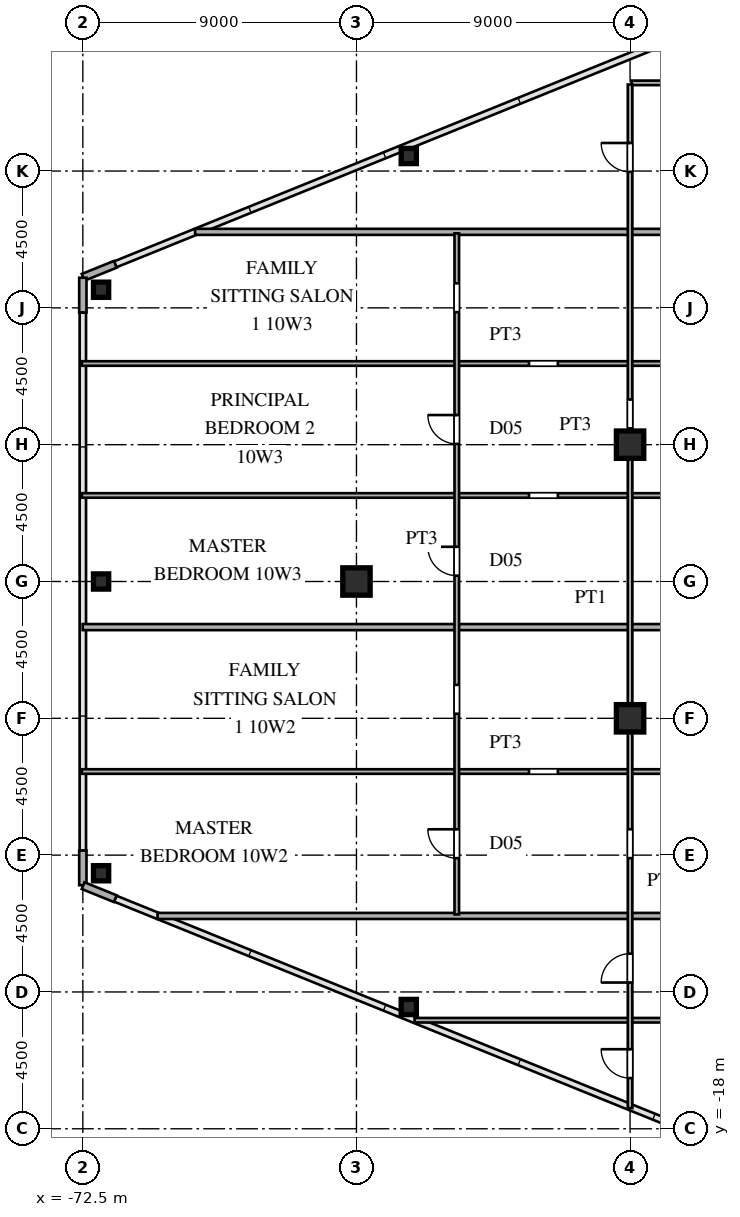
"""IFC4 building model, lengths in metres.
Left out: names, types, materials, properties, quantities, classifications, styles, units other than length and angle.
Written with IfcOpenShell. Run it as: python <this file> out.ifc"""

import sys

from ifc_helpers import new_model, si_unit, direction, frame, frame_2d, origin, origin_2d, place, context, subcontext, project, spatial, rectangle, hollow_rectangle, i_section, extrude, source, transform, mapped, element, fill, save


model = new_model("IFC4")
c1 = context("Model", 3, precision=1e-05, world=origin(), true_north=direction((0.0, 1.0)))
c2 = subcontext(c1, "Body", "Model", "MODEL_VIEW")
j1 = project(units=[si_unit("LENGTHUNIT", "METRE"), si_unit("PLANEANGLEUNIT", "RADIAN")], contexts=[c1])
p1 = place(None, origin())
s1 = spatial("IfcSite", under=j1, at=p1, CompositionType="ELEMENT")
p2 = place(p1, origin())
s2 = spatial("IfcBuilding", under=s1, at=p2, CompositionType="ELEMENT")
p3 = place(p2, frame((0.0, 0.0, 40.5)))
s3 = spatial("IfcBuildingStorey", under=s2, at=p3, CompositionType="ELEMENT", Elevation=40.5)
m1 = source(origin(), c2, "Body", "SweptSolid", [
    extrude(i_section(OverallWidth=0.9, OverallDepth=0.9, WebThickness=0.036, FlangeThickness=0.055, at=origin_2d()), origin(), (0.0, 0.0, 1.0), 3.6),
])
for number, where, z_axis, x_axis in (
    (1, (-54.5, -4.5, 0.0), (0.0, 0.0, 1.0), (1.0, 0.0, 0.0)),
    (2, (-54.5, 4.5, 0.0), (0.0, 0.0, 1.0), (1.0, 0.0, 0.0)),
    (3, (-63.5, 0.0, 0.0), (0.0, 0.0, 1.0), (1.0, 0.0, 0.0)),
):
    element("IfcColumn", number, at=place(p3, frame(where, z_axis=z_axis, x_axis=x_axis)), inside=s3, PredefinedType="COLUMN", context=c2, shape_type="MappedRepresentation", body=[
        mapped(m1, transform((0.0, 0.0, 0.0), scale=1.0)),
    ])
m2 = source(origin(), c2, "Body", "SweptSolid", [
    extrude(hollow_rectangle(XDim=0.5, YDim=0.5, WallThickness=0.02, at=origin_2d()), origin(), (0.0, 0.0, 1.0), 3.6),
])
for number, where, z_axis, x_axis in (
    (4, (-71.9, 9.596, 0.0), (0.0, 0.0, 1.0), (1.0, 0.0, 0.0)),
    (5, (-71.9, -9.596, 0.0), (0.0, 0.0, 1.0), (1.0, 0.0, 0.0)),
    (6, (-61.779, -13.994, 0.0), (0.0, 0.0, 1.0), (1.0, 0.0, 0.0)),
    (7, (-61.779, 13.994, 0.0), (0.0, 0.0, 1.0), (1.0, 0.0, 0.0)),
    (8, (-71.9, 0.0, 0.0), (0.0, 0.0, 1.0), (1.0, 0.0, 0.0)),
):
    element("IfcColumn", number, at=place(p3, frame(where, z_axis=z_axis, x_axis=x_axis)), inside=s3, PredefinedType="COLUMN", context=c2, shape_type="MappedRepresentation", body=[
        mapped(m2, transform((0.0, 0.0, 0.0), scale=1.0)),
    ])
for number, where, z_axis, x_axis in (
    (9, (-71.434, 10.431, 0.0), (0.0, 0.0, 1.0), (-0.927, -0.375, 0.0)),
    (10, (-72.5, 9.99, 0.0), (0.0, 0.0, 1.0), (0.0, -1.0, 0.0)),
    (11, (-72.5, -8.85, 0.0), (0.0, 0.0, 1.0), (0.0, -1.0, 0.0)),
    (12, (-72.491, -10.004, 0.0), (0.0, 0.0, 1.0), (0.927, -0.375, 0.0)),
):
    element("IfcWall", number, at=place(p3, frame(where, z_axis=z_axis, x_axis=x_axis)), inside=s3, PredefinedType="SOLIDWALL", context=c2, shape_type="SweptSolid", body=[
        extrude(rectangle(XDim=1.14, YDim=0.24, at=frame_2d((0.57, 0.0))), origin(), (0.0, 0.0, 1.0), 3.38),
    ])
p4 = place(p3, frame((-61.588, -14.43, 0.0), z_axis=(0.0, 0.0, 1.0), x_axis=(1.0, 0.0, 0.0)))
e13 = element("IfcWall", 13, at=p4, inside=s3, PredefinedType="PARTITIONING", context=c2, shape_type="SweptSolid", body=[
    extrude(rectangle(XDim=16.938, YDim=0.15, at=frame_2d((8.469, 0.0))), origin(), (0.0, 0.0, 1.0), 3.38),
])
p5 = place(p4, frame((11.563, 0.0, 0.0)))
e14 = element("IfcOpeningElement", 14, at=p5, cuts=e13, PredefinedType="OPENING", context=c2, shape_type="SweptSolid", body=[
    extrude(rectangle(XDim=0.95, YDim=2.15, at=frame_2d((0.475, 1.075))), frame((0.0, 0.085, 0.0), z_axis=(0.0, -1.0, 0.0), x_axis=(1.0, 0.0, 0.0)), (0.0, 0.0, 1.0), 0.17),
])
p6 = place(p3, frame((-70.043, -11.0, 0.0), z_axis=(0.0, 0.0, 1.0), x_axis=(1.0, 0.0, 0.0)))
e15 = element("IfcWall", 15, at=p6, inside=s3, PredefinedType="PARTITIONING", context=c2, shape_type="SweptSolid", body=[
    extrude(rectangle(XDim=30.963, YDim=0.2, at=frame_2d((15.481, 0.0))), origin(), (0.0, 0.0, 1.0), 3.38),
])
p7 = place(p3, frame((-72.535, -6.25, 0.0), z_axis=(0.0, 0.0, 1.0), x_axis=(1.0, 0.0, 0.0)))
e16 = element("IfcWall", 16, at=p7, inside=s3, PredefinedType="PARTITIONING", context=c2, shape_type="SweptSolid", body=[
    extrude(rectangle(XDim=27.885, YDim=0.15, at=frame_2d((13.942, 0.0))), origin(), (0.0, 0.0, 1.0), 3.38),
])
p8 = place(p7, frame((14.71, 0.0, 0.0)))
e17 = element("IfcOpeningElement", 17, at=p8, cuts=e16, PredefinedType="OPENING", context=c2, shape_type="SweptSolid", body=[
    extrude(rectangle(XDim=0.95, YDim=2.15, at=frame_2d((0.475, 1.075))), frame((0.0, 0.085, 0.0), z_axis=(0.0, -1.0, 0.0), x_axis=(1.0, 0.0, 0.0)), (0.0, 0.0, 1.0), 0.17),
])
p9 = place(p3, frame((-72.505, -1.5, 0.0), z_axis=(0.0, 0.0, 1.0), x_axis=(1.0, 0.0, 0.0)))
e18 = element("IfcWall", 18, at=p9, inside=s3, PredefinedType="PARTITIONING", context=c2, shape_type="SweptSolid", body=[
    extrude(rectangle(XDim=33.425, YDim=0.2, at=frame_2d((16.712, 0.0))), origin(), (0.0, 0.0, 1.0), 3.38),
])
p10 = place(p3, frame((-72.535, 2.83, 0.0), z_axis=(0.0, 0.0, 1.0), x_axis=(1.0, 0.0, 0.0)))
e19 = element("IfcWall", 19, at=p10, inside=s3, PredefinedType="PARTITIONING", context=c2, shape_type="SweptSolid", body=[
    extrude(rectangle(XDim=27.885, YDim=0.15, at=frame_2d((13.942, 0.0))), origin(), (0.0, 0.0, 1.0), 3.38),
])
p11 = place(p10, frame((22.51, 0.0, 0.0)))
e20 = element("IfcOpeningElement", 20, at=p11, cuts=e19, PredefinedType="OPENING", context=c2, shape_type="SweptSolid", body=[
    extrude(rectangle(XDim=0.95, YDim=2.15, at=frame_2d((0.475, 1.075))), frame((0.0, 0.085, 0.0), z_axis=(0.0, -1.0, 0.0), x_axis=(1.0, 0.0, 0.0)), (0.0, 0.0, 1.0), 0.17),
])
p12 = place(p10, frame((14.71, 0.0, 0.0)))
e21 = element("IfcOpeningElement", 21, at=p12, cuts=e19, PredefinedType="OPENING", context=c2, shape_type="SweptSolid", body=[
    extrude(rectangle(XDim=0.95, YDim=2.15, at=frame_2d((0.475, 1.075))), frame((0.0, 0.085, 0.0), z_axis=(0.0, -1.0, 0.0), x_axis=(1.0, 0.0, 0.0)), (0.0, 0.0, 1.0), 0.17),
])
p13 = place(p3, frame((-72.535, 7.17, 0.0), z_axis=(0.0, 0.0, 1.0), x_axis=(1.0, 0.0, 0.0)))
e22 = element("IfcWall", 22, at=p13, inside=s3, PredefinedType="PARTITIONING", context=c2, shape_type="SweptSolid", body=[
    extrude(rectangle(XDim=27.885, YDim=0.15, at=frame_2d((13.942, 0.0))), origin(), (0.0, 0.0, 1.0), 3.38),
])
p14 = place(p13, frame((22.51, 0.0, 0.0)))
e23 = element("IfcOpeningElement", 23, at=p14, cuts=e22, PredefinedType="OPENING", context=c2, shape_type="SweptSolid", body=[
    extrude(rectangle(XDim=0.95, YDim=2.15, at=frame_2d((0.475, 1.075))), frame((0.0, 0.085, 0.0), z_axis=(0.0, -1.0, 0.0), x_axis=(1.0, 0.0, 0.0)), (0.0, 0.0, 1.0), 0.17),
])
p15 = place(p13, frame((14.71, 0.0, 0.0)))
e24 = element("IfcOpeningElement", 24, at=p15, cuts=e22, PredefinedType="OPENING", context=c2, shape_type="SweptSolid", body=[
    extrude(rectangle(XDim=0.95, YDim=2.15, at=frame_2d((0.475, 1.075))), frame((0.0, 0.085, 0.0), z_axis=(0.0, -1.0, 0.0), x_axis=(1.0, 0.0, 0.0)), (0.0, 0.0, 1.0), 0.17),
])
p16 = place(p3, frame((-68.807, 11.5, 0.0), z_axis=(0.0, 0.0, 1.0), x_axis=(1.0, 0.0, 0.0)))
e25 = element("IfcWall", 25, at=p16, inside=s3, PredefinedType="PARTITIONING", context=c2, shape_type="SweptSolid", body=[
    extrude(rectangle(XDim=29.727, YDim=0.2, at=frame_2d((14.863, 0.0))), origin(), (0.0, 0.0, 1.0), 3.38),
])
p17 = place(p3, frame((-54.45, 16.4, 0.0), z_axis=(0.0, 0.0, 1.0), x_axis=(1.0, 0.0, 0.0)))
e26 = element("IfcWall", 26, at=p17, inside=s3, PredefinedType="PARTITIONING", context=c2, shape_type="SweptSolid", body=[
    extrude(rectangle(XDim=9.8, YDim=0.15, at=frame_2d((4.9, 0.0))), origin(), (0.0, 0.0, 1.0), 3.38),
])
p18 = place(p17, frame((4.425, 0.0, 0.0)))
e27 = element("IfcOpeningElement", 27, at=p18, cuts=e26, PredefinedType="OPENING", context=c2, shape_type="SweptSolid", body=[
    extrude(rectangle(XDim=0.95, YDim=2.15, at=frame_2d((0.475, 1.075))), frame((0.0, 0.085, 0.0), z_axis=(0.0, -1.0, 0.0), x_axis=(1.0, 0.0, 0.0)), (0.0, 0.0, 1.0), 0.17),
])
p19 = place(p3, frame((-60.2, -10.95, 0.0), z_axis=(0.0, 0.0, 1.0), x_axis=(0.0, 1.0, 0.0)))
e28 = element("IfcWall", 28, at=p19, inside=s3, PredefinedType="PARTITIONING", context=c2, shape_type="SweptSolid", body=[
    extrude(rectangle(XDim=22.4, YDim=0.15, at=frame_2d((11.2, 0.0))), origin(), (0.0, 0.0, 1.0), 3.38),
])
p20 = place(p19, frame((1.85, 0.0, 0.0)))
e29 = element("IfcOpeningElement", 29, at=p20, cuts=e28, PredefinedType="OPENING", context=c2, shape_type="SweptSolid", body=[
    extrude(rectangle(XDim=0.95, YDim=2.15, at=frame_2d((0.475, 1.075))), frame((0.0, 0.085, 0.0), z_axis=(0.0, -1.0, 0.0), x_axis=(1.0, 0.0, 0.0)), (0.0, 0.0, 1.0), 0.17),
])
p21 = place(p19, frame((6.6, 0.0, 0.0)))
e30 = element("IfcOpeningElement", 30, at=p21, cuts=e28, PredefinedType="OPENING", context=c2, shape_type="SweptSolid", body=[
    extrude(rectangle(XDim=0.95, YDim=2.15, at=frame_2d((0.475, 1.075))), frame((0.0, 0.085, 0.0), z_axis=(0.0, -1.0, 0.0), x_axis=(1.0, 0.0, 0.0)), (0.0, 0.0, 1.0), 0.17),
])
p22 = place(p19, frame((11.142, 0.0, 0.0)))
e31 = element("IfcOpeningElement", 31, at=p22, cuts=e28, PredefinedType="OPENING", context=c2, shape_type="SweptSolid", body=[
    extrude(rectangle(XDim=0.95, YDim=2.15, at=frame_2d((0.475, 1.075))), frame((0.0, 0.085, 0.0), z_axis=(0.0, -1.0, 0.0), x_axis=(1.0, 0.0, 0.0)), (0.0, 0.0, 1.0), 0.17),
])
p23 = place(p19, frame((15.475, 0.0, 0.0)))
e32 = element("IfcOpeningElement", 32, at=p23, cuts=e28, PredefinedType="OPENING", context=c2, shape_type="SweptSolid", body=[
    extrude(rectangle(XDim=0.95, YDim=2.15, at=frame_2d((0.475, 1.075))), frame((0.0, 0.085, 0.0), z_axis=(0.0, -1.0, 0.0), x_axis=(1.0, 0.0, 0.0)), (0.0, 0.0, 1.0), 0.17),
])
p24 = place(p19, frame((19.808, 0.0, 0.0)))
e33 = element("IfcOpeningElement", 33, at=p24, cuts=e28, PredefinedType="OPENING", context=c2, shape_type="SweptSolid", body=[
    extrude(rectangle(XDim=0.95, YDim=2.15, at=frame_2d((0.475, 1.075))), frame((0.0, 0.085, 0.0), z_axis=(0.0, -1.0, 0.0), x_axis=(1.0, 0.0, 0.0)), (0.0, 0.0, 1.0), 0.17),
])
p25 = place(p3, frame((-54.5, -17.321, 0.0), z_axis=(0.0, 0.0, 1.0), x_axis=(0.0, 1.0, 0.0)))
e34 = element("IfcWall", 34, at=p25, inside=s3, PredefinedType="PARTITIONING", context=c2, shape_type="SweptSolid", body=[
    extrude(rectangle(XDim=33.667, YDim=0.15, at=frame_2d((16.833, 0.0))), origin(), (0.0, 0.0, 1.0), 2.68),
])
p26 = place(p25, frame((0.988, 0.0, 0.0)))
e35 = element("IfcOpeningElement", 35, at=p26, cuts=e34, PredefinedType="OPENING", context=c2, shape_type="SweptSolid", body=[
    extrude(rectangle(XDim=0.95, YDim=2.15, at=frame_2d((0.475, 1.075))), frame((0.0, 0.085, 0.0), z_axis=(0.0, -1.0, 0.0), x_axis=(1.0, 0.0, 0.0)), (0.0, 0.0, 1.0), 0.17),
])
p27 = place(p25, frame((4.131, 0.0, 0.0)))
e36 = element("IfcOpeningElement", 36, at=p27, cuts=e34, PredefinedType="OPENING", context=c2, shape_type="SweptSolid", body=[
    extrude(rectangle(XDim=0.95, YDim=2.15, at=frame_2d((0.475, 1.075))), frame((0.0, 0.085, 0.0), z_axis=(0.0, -1.0, 0.0), x_axis=(1.0, 0.0, 0.0)), (0.0, 0.0, 1.0), 0.17),
])
p28 = place(p25, frame((8.221, 0.0, 0.0)))
e37 = element("IfcOpeningElement", 37, at=p28, cuts=e34, PredefinedType="OPENING", context=c2, shape_type="SweptSolid", body=[
    extrude(rectangle(XDim=0.95, YDim=2.15, at=frame_2d((0.475, 1.075))), frame((0.0, 0.085, 0.0), z_axis=(0.0, -1.0, 0.0), x_axis=(1.0, 0.0, 0.0)), (0.0, 0.0, 1.0), 0.17),
])
p29 = place(p25, frame((22.357, 0.0, 0.0)))
e38 = element("IfcOpeningElement", 38, at=p29, cuts=e34, PredefinedType="OPENING", context=c2, shape_type="SweptSolid", body=[
    extrude(rectangle(XDim=0.95, YDim=2.15, at=frame_2d((0.475, 1.075))), frame((0.0, 0.085, 0.0), z_axis=(0.0, -1.0, 0.0), x_axis=(1.0, 0.0, 0.0)), (0.0, 0.0, 1.0), 0.17),
])
p30 = place(p25, frame((30.794, 0.0, 0.0)))
e39 = element("IfcOpeningElement", 39, at=p30, cuts=e34, PredefinedType="OPENING", context=c2, shape_type="SweptSolid", body=[
    extrude(rectangle(XDim=0.95, YDim=2.15, at=frame_2d((0.475, 1.075))), frame((0.0, 0.085, 0.0), z_axis=(0.0, -1.0, 0.0), x_axis=(1.0, 0.0, 0.0)), (0.0, 0.0, 1.0), 0.17),
])
m3 = source(origin(), c2, "Body", "SweptSolid", [
    extrude(rectangle(XDim=0.95, YDim=2.15, at=frame_2d((0.475, 1.075))), frame((0.0, 0.025, 0.0), z_axis=(0.0, -1.0, 0.0), x_axis=(1.0, 0.0, 0.0)), (0.0, 0.0, 1.0), 0.05),
])
p31 = place(p20, origin())
e40 = element("IfcDoor", 40, at=p31, inside=s3, OperationType="SINGLE_SWING_RIGHT", PredefinedType="DOOR", context=c2, shape_type="MappedRepresentation", body=[
    mapped(m3, transform((0.0, 0.0, 0.0), scale=1.0)),
])
fill(e29, e40)
p32 = place(p22, origin())
e41 = element("IfcDoor", 41, at=p32, inside=s3, OperationType="SINGLE_SWING_RIGHT", PredefinedType="DOOR", context=c2, shape_type="MappedRepresentation", body=[
    mapped(m3, transform((0.0, 0.0, 0.0), scale=1.0)),
])
fill(e31, e41)
p33 = place(p23, origin())
e42 = element("IfcDoor", 42, at=p33, inside=s3, OperationType="SINGLE_SWING_RIGHT", PredefinedType="DOOR", context=c2, shape_type="MappedRepresentation", body=[
    mapped(m3, transform((0.0, 0.0, 0.0), scale=1.0)),
])
fill(e32, e42)
p34 = place(p26, origin())
e43 = element("IfcDoor", 43, at=p34, inside=s3, OperationType="SINGLE_SWING_RIGHT", PredefinedType="DOOR", context=c2, shape_type="MappedRepresentation", body=[
    mapped(m3, transform((0.0, 0.0, 0.0), scale=1.0)),
])
fill(e35, e43)
p35 = place(p27, origin())
e44 = element("IfcDoor", 44, at=p35, inside=s3, OperationType="SINGLE_SWING_LEFT", PredefinedType="DOOR", context=c2, shape_type="MappedRepresentation", body=[
    mapped(m3, transform((0.0, 0.0, 0.0), scale=1.0)),
])
fill(e36, e44)
p36 = place(p30, origin())
e45 = element("IfcDoor", 45, at=p36, inside=s3, OperationType="SINGLE_SWING_RIGHT", PredefinedType="DOOR", context=c2, shape_type="MappedRepresentation", body=[
    mapped(m3, transform((0.0, 0.0, 0.0), scale=1.0)),
])
fill(e39, e45)
save(model, sys.argv[1])
